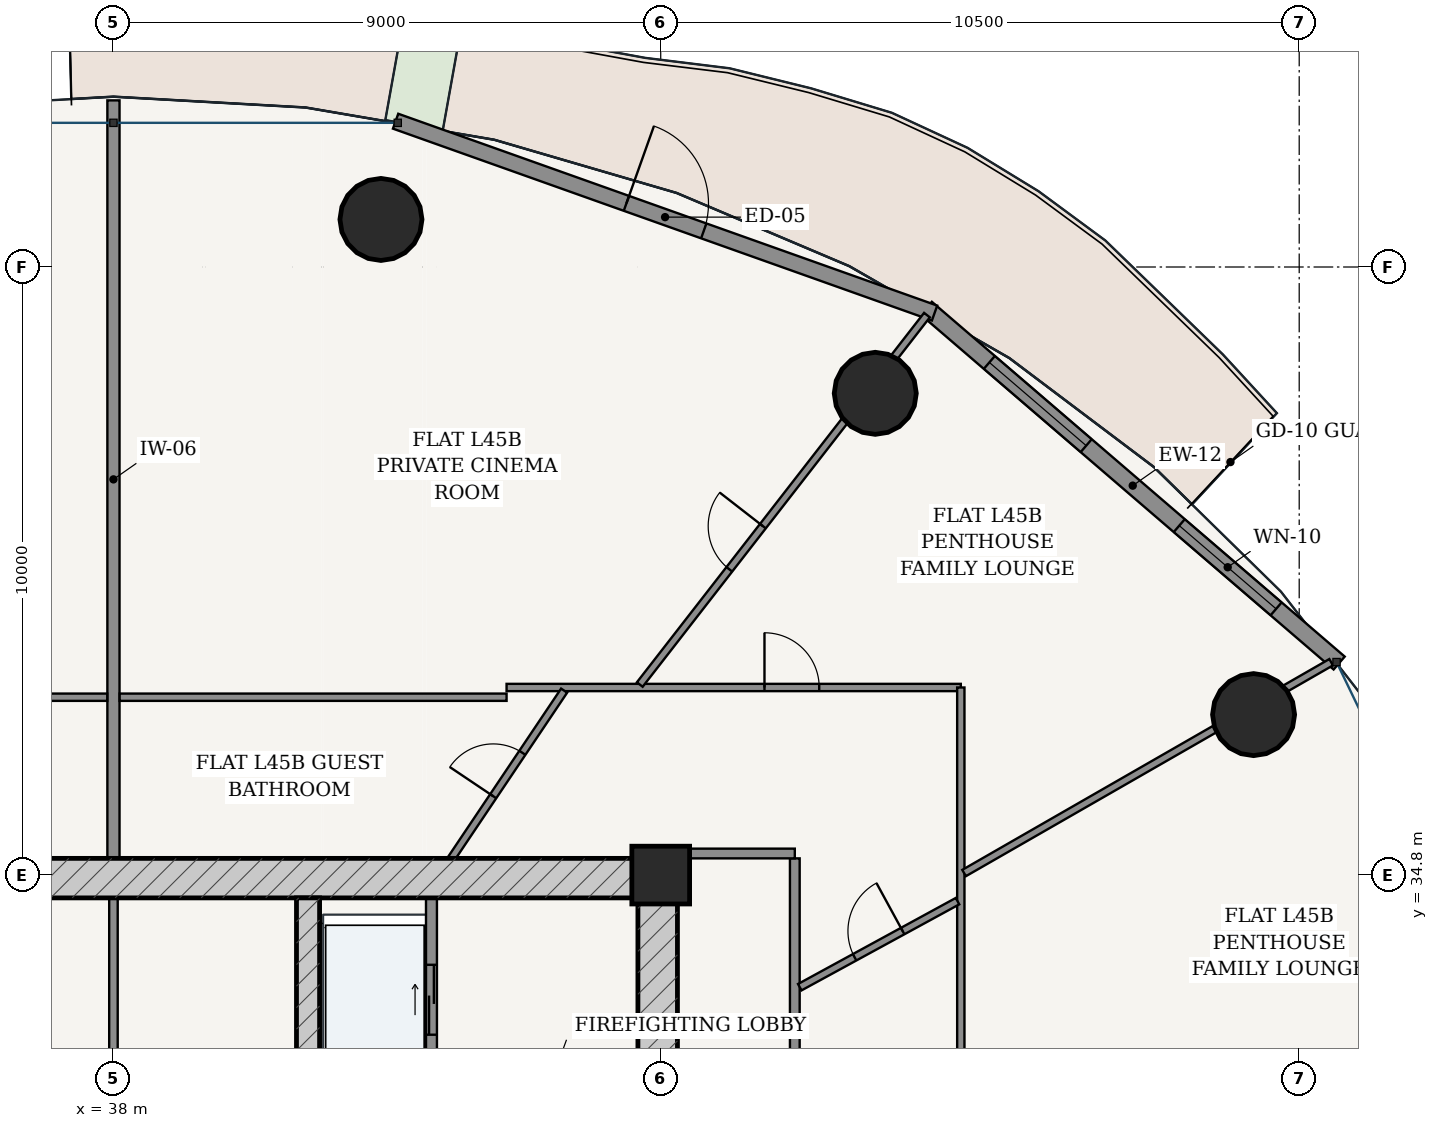
"""IFC4 building model, lengths in metres.
Left out: names, types, materials, properties, quantities, classifications, styles, units other than length and angle.
Written with IfcOpenShell. Run it as: python <this file> out.ifc"""

import sys

from ifc_helpers import new_model, si_unit, direction, frame, frame_2d, origin, origin_2d, place, context, subcontext, project, spatial, rectangle, hollow_circle, extrude, source, transform, mapped, element, fill, save


model = new_model("IFC4")
c1 = context("Model", 3, precision=1e-05, world=origin(), true_north=direction((-0.2419218956, 0.970295726276)))
c2 = subcontext(c1, "Body", "Model", "MODEL_VIEW")
j1 = project(units=[si_unit("LENGTHUNIT", "METRE"), si_unit("PLANEANGLEUNIT", "RADIAN")], contexts=[c1])
p1 = place(None, origin())
s1 = spatial("IfcSite", under=j1, at=p1, CompositionType="ELEMENT")
p2 = place(p1, origin())
s2 = spatial("IfcBuilding", under=s1, at=p2, CompositionType="ELEMENT")
p3 = place(p2, frame((0.0, 0.0, 171.4)))
s3 = spatial("IfcBuildingStorey", under=s2, at=p3, CompositionType="ELEMENT", Elevation=171.4)
p4 = place(p3, frame((47.0, 34.8, 0.0), z_axis=(0.0, 0.0, 1.0), x_axis=(1.0, 0.0, 0.0)))
e1 = element("IfcColumn", 1, at=p4, inside=s3, PredefinedType="COLUMN", context=c2, shape_type="SweptSolid", body=[
    extrude(rectangle(XDim=0.95, YDim=0.95, at=origin_2d()), origin(), (0.0, 0.0, 1.0), 3.6),
])
p5 = place(p3, frame((28.725, 34.75, 0.0), z_axis=(0.0, 0.0, 1.0), x_axis=(1.0, 0.0, 0.0)))
e2 = element("IfcWall", 2, at=p5, inside=s3, PredefinedType="SHEAR", context=c2, shape_type="SweptSolid", body=[
    extrude(rectangle(XDim=18.55, YDim=0.65, at=frame_2d((9.275, 0.0))), origin(), (0.0, 0.0, 1.0), 3.33),
])
p6 = place(p3, frame((46.95, 19.175, 0.0), z_axis=(0.0, 0.0, 1.0), x_axis=(0.0, 1.0, 0.0)))
e3 = element("IfcWall", 3, at=p6, inside=s3, PredefinedType="SHEAR", context=c2, shape_type="SweptSolid", body=[
    extrude(rectangle(XDim=15.25, YDim=0.65, at=frame_2d((7.625, 0.0))), origin(), (0.0, 0.0, 1.0), 3.33),
])
p7 = place(p6, frame((9.875, 0.0, 0.0)))
e4 = element("IfcOpeningElement", 4, at=p7, cuts=e3, PredefinedType="OPENING", context=c2, shape_type="SweptSolid", body=[
    extrude(rectangle(XDim=1.5, YDim=2.2, at=frame_2d((0.75, 1.1))), frame((0.0, 0.335, 0.0), z_axis=(0.0, -1.0, 0.0), x_axis=(1.0, 0.0, 0.0)), (0.0, 0.0, 1.0), 0.67),
])
p8 = place(p3, frame((41.2, 19.175, 0.0), z_axis=(0.0, 0.0, 1.0), x_axis=(0.0, 1.0, 0.0)))
e5 = element("IfcWall", 5, at=p8, inside=s3, PredefinedType="SHEAR", context=c2, shape_type="SweptSolid", body=[
    extrude(rectangle(XDim=15.25, YDim=0.38, at=frame_2d((7.625, 0.0))), origin(), (0.0, 0.0, 1.0), 3.33),
])
p9 = place(p8, frame((7.8, 0.0, 0.0)))
e6 = element("IfcOpeningElement", 6, at=p9, cuts=e5, PredefinedType="OPENING", context=c2, shape_type="SweptSolid", body=[
    extrude(rectangle(XDim=1.05, YDim=2.15, at=frame_2d((0.525, 1.075))), frame((0.0, 0.2, 0.0), z_axis=(0.0, -1.0, 0.0), x_axis=(1.0, 0.0, 0.0)), (0.0, 0.0, 1.0), 0.4),
])
for number, where, z_axis, x_axis in (
    (7, (56.75, 37.439, 0.0), (0.0, 0.0, 1.0), (1.0, 0.0, 0.0)),
    (8, (50.528, 42.723, 0.0), (0.0, 0.0, 1.0), (1.0, 0.0, 0.0)),
    (9, (42.399, 45.582, 0.0), (0.0, 0.0, 1.0), (1.0, 0.0, 0.0)),
):
    element("IfcColumn", number, at=place(p3, frame(where, z_axis=z_axis, x_axis=x_axis)), inside=s3, PredefinedType="COLUMN", context=c2, shape_type="SweptSolid", body=[
        extrude(hollow_circle(Radius=0.675, WallThickness=0.042, at=origin_2d()), origin(), (0.0, 0.0, 1.0), 3.6),
    ])
p10 = place(p3, frame((58.157, 38.287, 0.0), z_axis=(0.0, 0.0, 1.0), x_axis=(-0.75843401647, 0.651749831348, 0.0)))
e10 = element("IfcWall", 10, at=p10, inside=s3, PredefinedType="SOLIDWALL", context=c2, shape_type="SweptSolid", body=[
    extrude(rectangle(XDim=8.952, YDim=0.28, at=frame_2d((4.476, 0.0))), origin(), (0.0, 0.0, 1.0), 3.33),
])
p11 = place(p10, frame((1.367, 0.0, 0.85)))
e11 = element("IfcOpeningElement", 11, at=p11, cuts=e10, PredefinedType="OPENING", context=c2, shape_type="SweptSolid", body=[
    extrude(rectangle(XDim=2.1, YDim=1.95, at=frame_2d((1.05, 0.975))), frame((0.0, 0.15, 0.0), z_axis=(0.0, -1.0, 0.0), x_axis=(1.0, 0.0, 0.0)), (0.0, 0.0, 1.0), 0.3),
])
p12 = place(p10, frame((5.485, 0.0, 0.85)))
e12 = element("IfcOpeningElement", 12, at=p12, cuts=e10, PredefinedType="OPENING", context=c2, shape_type="SweptSolid", body=[
    extrude(rectangle(XDim=2.1, YDim=1.95, at=frame_2d((1.05, 0.975))), frame((0.0, 0.15, 0.0), z_axis=(0.0, -1.0, 0.0), x_axis=(1.0, 0.0, 0.0)), (0.0, 0.0, 1.0), 0.3),
])
p13 = place(p3, frame((51.503, 44.043, 0.0), z_axis=(0.0, 0.0, 1.0), x_axis=(-0.942095406405, 0.335344964522, 0.0)))
e13 = element("IfcWall", 13, at=p13, inside=s3, PredefinedType="SOLIDWALL", context=c2, shape_type="SweptSolid", body=[
    extrude(rectangle(XDim=9.408, YDim=0.26, at=frame_2d((4.704, 0.0))), origin(), (0.0, 0.0, 1.0), 3.33),
])
p14 = place(p13, frame((4.029, 0.0, 0.0)))
e14 = element("IfcOpeningElement", 14, at=p14, cuts=e13, PredefinedType="OPENING", context=c2, shape_type="SweptSolid", body=[
    extrude(rectangle(XDim=1.35, YDim=2.2, at=frame_2d((0.675, 1.1))), frame((0.0, 0.14, 0.0), z_axis=(0.0, -1.0, 0.0), x_axis=(1.0, 0.0, 0.0)), (0.0, 0.0, 1.0), 0.28),
])
p15 = place(p3, frame((43.23, 28.52, 0.0), z_axis=(0.0, 0.0, 1.0), x_axis=(0.0, 1.0, 0.0)))
e15 = element("IfcWall", 15, at=p15, inside=s3, PredefinedType="PARTITIONING", context=c2, shape_type="SweptSolid", body=[
    extrude(rectangle(XDim=5.905, YDim=0.18, at=frame_2d((2.953, 0.0))), origin(), (0.0, 0.0, 1.0), 3.33),
])
p16 = place(p15, frame((0.905, 0.0, 0.0)))
e16 = element("IfcOpeningElement", 16, at=p16, cuts=e15, PredefinedType="OPENING", context=c2, shape_type="SweptSolid", body=[
    extrude(rectangle(XDim=0.85, YDim=2.1, at=frame_2d((0.425, 1.05))), frame((0.0, 0.1, 0.0), z_axis=(0.0, -1.0, 0.0), x_axis=(1.0, 0.0, 0.0)), (0.0, 0.0, 1.0), 0.2),
])
p17 = place(p15, frame((3.655, 0.0, 0.0)))
e17 = element("IfcOpeningElement", 17, at=p17, cuts=e15, PredefinedType="OPENING", context=c2, shape_type="SweptSolid", body=[
    extrude(rectangle(XDim=1.15, YDim=2.2, at=frame_2d((0.575, 1.1))), frame((0.0, 0.1, 0.0), z_axis=(0.0, -1.0, 0.0), x_axis=(1.0, 0.0, 0.0)), (0.0, 0.0, 1.0), 0.2),
])
p18 = place(p3, frame((38.0, 28.56, 0.0), z_axis=(0.0, 0.0, 1.0), x_axis=(0.0, 1.0, 0.0)))
e18 = element("IfcWall", 18, at=p18, inside=s3, PredefinedType="PARTITIONING", context=c2, shape_type="SweptSolid", body=[
    extrude(rectangle(XDim=5.865, YDim=0.14, at=frame_2d((2.933, 0.0))), origin(), (0.0, 0.0, 1.0), 3.33),
])
p19 = place(p3, frame((49.205, 16.675, 0.0), z_axis=(0.0, 0.0, 1.0), x_axis=(0.0, 1.0, 0.0)))
e19 = element("IfcWall", 19, at=p19, inside=s3, PredefinedType="PARTITIONING", context=c2, shape_type="SweptSolid", body=[
    extrude(rectangle(XDim=18.4, YDim=0.16, at=frame_2d((9.2, 0.0))), origin(), (0.0, 0.0, 1.0), 2.776),
])
p20 = place(p3, frame((47.275, 35.155, 0.0), z_axis=(0.0, 0.0, 1.0), x_axis=(1.0, 0.0, 0.0)))
e20 = element("IfcWall", 20, at=p20, inside=s3, PredefinedType="PARTITIONING", context=c2, shape_type="SweptSolid", body=[
    extrude(rectangle(XDim=1.93, YDim=0.16, at=frame_2d((0.965, 0.0))), origin(), (0.0, 0.0, 1.0), 2.776),
])
p21 = place(p3, frame((38.0, 35.075, 0.0), z_axis=(0.0, 0.0, 1.0), x_axis=(0.0, 1.0, 0.0)))
e21 = element("IfcWall", 21, at=p21, inside=s3, PredefinedType="PARTITIONING", context=c2, shape_type="SweptSolid", body=[
    extrude(rectangle(XDim=12.465, YDim=0.2, at=frame_2d((6.232, 0.0))), origin(), (0.0, 0.0, 1.0), 2.415),
])
for number, where, z_axis, x_axis in (
    (22, (31.535, 37.725, 0.0), (0.0, 0.0, 1.0), (1.0, 0.0, 0.0)),
    (23, (38.102, 37.725, 0.0), (0.0, 0.0, 1.0), (1.0, 0.0, 0.0)),
):
    element("IfcWall", number, at=place(p3, frame(where, z_axis=z_axis, x_axis=x_axis)), inside=s3, PredefinedType="PARTITIONING", context=c2, shape_type="SweptSolid", body=[
        extrude(rectangle(XDim=6.363, YDim=0.12, at=frame_2d((3.182, 0.0))), origin(), (0.0, 0.0, 1.0), 2.776),
    ])
p22 = place(p3, frame((44.465, 37.885, 0.0), z_axis=(0.0, 0.0, 1.0), x_axis=(1.0, 0.0, 0.0)))
e24 = element("IfcWall", 24, at=p22, inside=s3, PredefinedType="PARTITIONING", context=c2, shape_type="SweptSolid", body=[
    extrude(rectangle(XDim=7.47, YDim=0.12, at=frame_2d((3.735, 0.0))), origin(), (0.0, 0.0, 1.0), 2.776),
])
p23 = place(p22, frame((4.241, 0.0, 0.0)))
e25 = element("IfcOpeningElement", 25, at=p23, cuts=e24, PredefinedType="OPENING", context=c2, shape_type="SweptSolid", body=[
    extrude(rectangle(XDim=0.9, YDim=2.15, at=frame_2d((0.45, 1.075))), frame((0.0, 0.07, 0.0), z_axis=(0.0, -1.0, 0.0), x_axis=(1.0, 0.0, 0.0)), (0.0, 0.0, 1.0), 0.14),
])
p24 = place(p3, frame((51.935, 37.885, 0.0), z_axis=(0.0, 0.0, 1.0), x_axis=(0.0, -1.0, 0.0)))
e26 = element("IfcWall", 26, at=p24, inside=s3, PredefinedType="PARTITIONING", context=c2, shape_type="SweptSolid", body=[
    extrude(rectangle(XDim=24.02, YDim=0.12, at=frame_2d((12.01, 0.0))), origin(), (0.0, 0.0, 1.0), 2.776),
])
p25 = place(p24, frame((19.821, 0.0, 0.0)))
e27 = element("IfcOpeningElement", 27, at=p25, cuts=e26, PredefinedType="OPENING", context=c2, shape_type="SweptSolid", body=[
    extrude(rectangle(XDim=0.9, YDim=2.15, at=frame_2d((0.45, 1.075))), frame((0.0, 0.07, 0.0), z_axis=(0.0, -1.0, 0.0), x_axis=(1.0, 0.0, 0.0)), (0.0, 0.0, 1.0), 0.14),
])
p26 = place(p3, frame((51.989, 34.834, 0.0), z_axis=(0.0, 0.0, 1.0), x_axis=(0.86717064002, 0.498011125466, 0.0)))
e28 = element("IfcWall", 28, at=p26, inside=s3, PredefinedType="PARTITIONING", context=c2, shape_type="SweptSolid", body=[
    extrude(rectangle(XDim=6.961, YDim=0.12, at=frame_2d((3.48, 0.0))), origin(), (0.0, 0.0, 1.0), 2.776),
])
p27 = place(p3, frame((46.656, 37.934, 0.0), z_axis=(0.0, 0.0, 1.0), x_axis=(0.613758289074, 0.789493991487, 0.0)))
e29 = element("IfcWall", 29, at=p27, inside=s3, PredefinedType="PARTITIONING", context=c2, shape_type="SweptSolid", body=[
    extrude(rectangle(XDim=7.695, YDim=0.12, at=frame_2d((3.848, 0.0))), origin(), (0.0, 0.0, 1.0), 2.776),
])
p28 = place(p27, frame((2.399, 0.0, 0.0)))
e30 = element("IfcOpeningElement", 30, at=p28, cuts=e29, PredefinedType="OPENING", context=c2, shape_type="SweptSolid", body=[
    extrude(rectangle(XDim=0.9, YDim=2.15, at=frame_2d((0.45, 1.075))), frame((0.0, 0.07, 0.0), z_axis=(0.0, -1.0, 0.0), x_axis=(1.0, 0.0, 0.0)), (0.0, 0.0, 1.0), 0.14),
])
p29 = place(p3, frame((49.287, 32.957, 0.0), z_axis=(0.0, 0.0, 1.0), x_axis=(0.877892414948, 0.47885792024, 0.0)))
e31 = element("IfcWall", 31, at=p29, inside=s3, PredefinedType="PARTITIONING", context=c2, shape_type="SweptSolid", body=[
    extrude(rectangle(XDim=2.955, YDim=0.12, at=frame_2d((1.477, 0.0))), origin(), (0.0, 0.0, 1.0), 3.33),
])
p30 = place(p29, frame((1.027, 0.0, 0.0)))
e32 = element("IfcOpeningElement", 32, at=p30, cuts=e31, PredefinedType="OPENING", context=c2, shape_type="SweptSolid", body=[
    extrude(rectangle(XDim=0.9, YDim=2.15, at=frame_2d((0.45, 1.075))), frame((0.0, 0.07, 0.0), z_axis=(0.0, -1.0, 0.0), x_axis=(1.0, 0.0, 0.0)), (0.0, 0.0, 1.0), 0.14),
])
p31 = place(p3, frame((43.559, 35.075, 0.0), z_axis=(0.0, 0.0, 1.0), x_axis=(0.557612855606, 0.830101140381, 0.0)))
e33 = element("IfcWall", 33, at=p31, inside=s3, PredefinedType="PARTITIONING", context=c2, shape_type="SweptSolid", body=[
    extrude(rectangle(XDim=3.323, YDim=0.12, at=frame_2d((1.662, 0.0))), origin(), (0.0, 0.0, 1.0), 3.33),
])
p32 = place(p31, frame((1.232, 0.0, 0.0)))
e34 = element("IfcOpeningElement", 34, at=p32, cuts=e33, PredefinedType="OPENING", context=c2, shape_type="SweptSolid", body=[
    extrude(rectangle(XDim=0.86, YDim=2.15, at=frame_2d((0.43, 1.075))), frame((0.0, 0.07, 0.0), z_axis=(0.0, -1.0, 0.0), x_axis=(1.0, 0.0, 0.0)), (0.0, 0.0, 1.0), 0.14),
])
m1 = source(origin(), c2, "Body", "SweptSolid", [
    extrude(rectangle(XDim=2.1, YDim=1.95, at=frame_2d((1.05, 0.975))), frame((0.0, 0.03, 0.0), z_axis=(0.0, -1.0, 0.0), x_axis=(1.0, 0.0, 0.0)), (0.0, 0.0, 1.0), 0.06),
])
p33 = place(p11, origin())
e35 = element("IfcWindow", 35, at=p33, inside=s3, PartitioningType="SINGLE_PANEL", PredefinedType="WINDOW", context=c2, shape_type="MappedRepresentation", body=[
    mapped(m1, transform((0.0, 0.0, 0.0), scale=1.0)),
])
fill(e11, e35)
p34 = place(p12, origin())
e36 = element("IfcWindow", 36, at=p34, inside=s3, PartitioningType="SINGLE_PANEL", PredefinedType="WINDOW", context=c2, shape_type="MappedRepresentation", body=[
    mapped(m1, transform((0.0, 0.0, 0.0), scale=1.0)),
])
fill(e12, e36)
m2 = source(origin(), c2, "Body", "SweptSolid", [
    extrude(rectangle(XDim=1.35, YDim=2.2, at=frame_2d((0.675, 1.1))), frame((0.0, 0.025, 0.0), z_axis=(0.0, -1.0, 0.0), x_axis=(1.0, 0.0, 0.0)), (0.0, 0.0, 1.0), 0.05),
])
p35 = place(p14, frame((1.35, 0.0, 0.0), z_axis=(0.0, 0.0, 1.0), x_axis=(-1.0, 0.0, 0.0)))
e37 = element("IfcDoor", 37, at=p35, inside=s3, OperationType="SINGLE_SWING_LEFT", PredefinedType="DOOR", context=c2, shape_type="MappedRepresentation", body=[
    mapped(m2, transform((0.0, 0.0, 0.0), scale=1.0)),
])
fill(e14, e37)
m3 = source(origin(), c2, "Body", "SweptSolid", [
    extrude(rectangle(XDim=1.15, YDim=2.2, at=frame_2d((0.575, 1.1))), frame((0.0, 0.025, 0.0), z_axis=(0.0, -1.0, 0.0), x_axis=(1.0, 0.0, 0.0)), (0.0, 0.0, 1.0), 0.05),
])
p36 = place(p17, origin())
e38 = element("IfcDoor", 38, at=p36, inside=s3, OperationType="DOUBLE_DOOR_SLIDING", PredefinedType="DOOR", context=c2, shape_type="MappedRepresentation", body=[
    mapped(m3, transform((0.0, 0.0, 0.0), scale=1.0)),
])
fill(e17, e38)
m4 = source(origin(), c2, "Body", "SweptSolid", [
    extrude(rectangle(XDim=0.9, YDim=2.15, at=frame_2d((0.45, 1.075))), frame((0.0, 0.025, 0.0), z_axis=(0.0, -1.0, 0.0), x_axis=(1.0, 0.0, 0.0)), (0.0, 0.0, 1.0), 0.05),
])
p37 = place(p30, origin())
e39 = element("IfcDoor", 39, at=p37, inside=s3, OperationType="SINGLE_SWING_RIGHT", PredefinedType="DOOR", context=c2, shape_type="MappedRepresentation", body=[
    mapped(m4, transform((0.0, 0.0, 0.0), scale=1.0)),
])
fill(e32, e39)
m5 = source(origin(), c2, "Body", "SweptSolid", [
    extrude(rectangle(XDim=0.86, YDim=2.15, at=frame_2d((0.43, 1.075))), frame((0.0, 0.025, 0.0), z_axis=(0.0, -1.0, 0.0), x_axis=(1.0, 0.0, 0.0)), (0.0, 0.0, 1.0), 0.05),
])
p38 = place(p32, origin())
e40 = element("IfcDoor", 40, at=p38, inside=s3, OperationType="SINGLE_SWING_LEFT", PredefinedType="DOOR", context=c2, shape_type="MappedRepresentation", body=[
    mapped(m5, transform((0.0, 0.0, 0.0), scale=1.0)),
])
fill(e34, e40)
p39 = place(p23, origin())
e41 = element("IfcDoor", 41, at=p39, inside=s3, OperationType="SINGLE_SWING_LEFT", PredefinedType="DOOR", context=c2, shape_type="MappedRepresentation", body=[
    mapped(m4, transform((0.0, 0.0, 0.0), scale=1.0)),
])
fill(e25, e41)
p40 = place(p28, origin())
e42 = element("IfcDoor", 42, at=p40, inside=s3, OperationType="SINGLE_SWING_RIGHT", PredefinedType="DOOR", context=c2, shape_type="MappedRepresentation", body=[
    mapped(m4, transform((0.0, 0.0, 0.0), scale=1.0)),
])
fill(e30, e42)
save(model, sys.argv[1])
